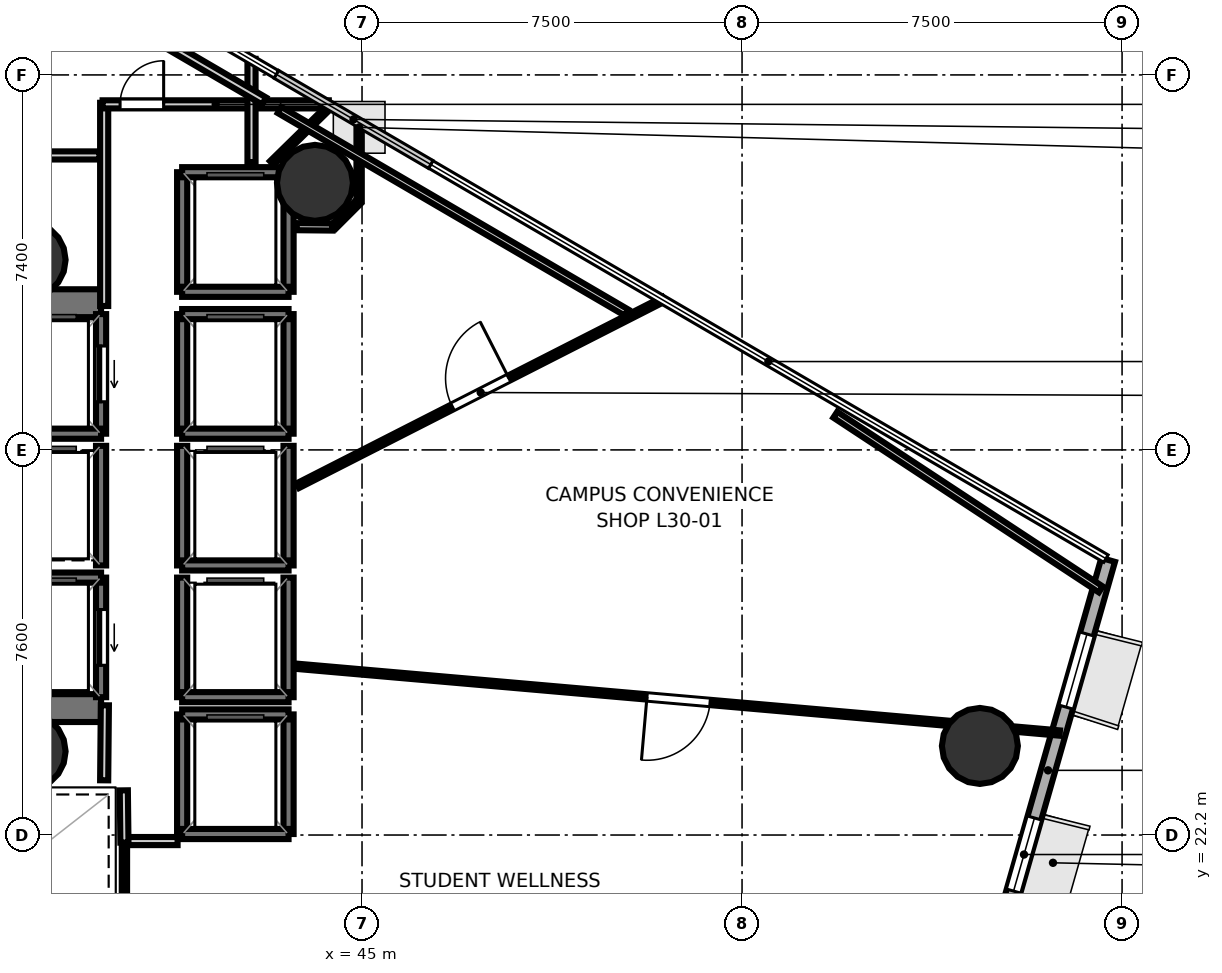
"""IFC4 building model, lengths in metres.
Left out: names, types, materials, properties, quantities, classifications, styles, units other than length and angle.
Written with IfcOpenShell. Run it as: python <this file> out.ifc"""

import sys

from ifc_helpers import new_model, si_unit, direction, frame, frame_2d, origin, origin_2d, place, context, subcontext, project, spatial, rectangle, hollow_circle, extrude, element, fill, save


model = new_model("IFC4")
c1 = context("Model", 3, precision=1e-05, world=origin(), true_north=direction((0.0, 1.0)))
c2 = subcontext(c1, "Body", "Model", "MODEL_VIEW")
j1 = project(units=[si_unit("LENGTHUNIT", "METRE"), si_unit("PLANEANGLEUNIT", "RADIAN")], contexts=[c1])
p1 = place(None, origin())
s1 = spatial("IfcSite", under=j1, at=p1, CompositionType="ELEMENT")
p2 = place(p1, origin())
s2 = spatial("IfcBuilding", under=s1, at=p2, CompositionType="ELEMENT")
p3 = place(p2, frame((0.0, 0.0, 120.0)))
s3 = spatial("IfcBuildingStorey", under=s2, at=p3, CompositionType="ELEMENT", Elevation=120.0)
p4 = place(p3, frame((29.23, 32.695, 0.0), z_axis=(0.0, 0.0, 1.0), x_axis=(1.0, 0.0, 0.0)))
e1 = element("IfcWall", 1, at=p4, inside=s3, PredefinedType="SHEAR", context=c2, shape_type="SweptSolid", body=[
    extrude(rectangle(XDim=10.62, YDim=0.55, at=frame_2d((5.31, 0.0))), origin(), (0.0, 0.0, 1.0), 3.52),
])
p5 = place(p4, frame((0.995, 0.0, 0.0)))
e2 = element("IfcOpeningElement", 2, at=p5, cuts=e1, PredefinedType="OPENING", context=c2, shape_type="SweptSolid", body=[
    extrude(rectangle(XDim=1.25, YDim=2.15, at=frame_2d((0.625, 1.075))), frame((0.0, 0.285, 0.0), z_axis=(0.0, -1.0, 0.0), x_axis=(1.0, 0.0, 0.0)), (0.0, 0.0, 1.0), 0.57),
])
p6 = place(p3, frame((29.23, 24.705, 0.0), z_axis=(0.0, 0.0, 1.0), x_axis=(1.0, 0.0, 0.0)))
e3 = element("IfcWall", 3, at=p6, inside=s3, PredefinedType="SHEAR", context=c2, shape_type="SweptSolid", body=[
    extrude(rectangle(XDim=10.62, YDim=0.55, at=frame_2d((5.31, 0.0))), origin(), (0.0, 0.0, 1.0), 3.52),
])
p7 = place(p6, frame((0.795, 0.0, 0.0)))
e4 = element("IfcOpeningElement", 4, at=p7, cuts=e3, PredefinedType="OPENING", context=c2, shape_type="SweptSolid", body=[
    extrude(rectangle(XDim=1.25, YDim=2.15, at=frame_2d((0.625, 1.075))), frame((0.0, 0.285, 0.0), z_axis=(0.0, -1.0, 0.0), x_axis=(1.0, 0.0, 0.0)), (0.0, 0.0, 1.0), 0.57),
])
for number, where, z_axis, x_axis in (
    (5, (38.4, 33.55, 0.0), (0.0, 0.0, 1.0), (1.0, 0.0, 0.0)),
    (6, (38.4, 23.85, 0.0), (0.0, 0.0, 1.0), (1.0, 0.0, 0.0)),
    (7, (57.194, 23.958, 0.0), (0.0, 0.0, 1.0), (1.0, 0.0, 0.0)),
    (8, (44.071, 35.07, 0.0), (0.0, 0.0, 1.0), (1.0, 0.0, 0.0)),
):
    element("IfcColumn", number, at=place(p3, frame(where, z_axis=z_axis, x_axis=x_axis)), inside=s3, PredefinedType="COLUMN", context=c2, shape_type="SweptSolid", body=[
        extrude(hollow_circle(Radius=0.75, WallThickness=0.036, at=origin_2d()), origin(), (0.0, 0.0, 1.0), 3.7),
    ])
p8 = place(p3, frame((57.353, 19.323, 0.0), z_axis=(0.0, 0.0, 1.0), x_axis=(0.274694997196, 0.961531413171, 0.0)))
e9 = element("IfcWall", 9, at=p8, inside=s3, PredefinedType="SOLIDWALL", context=c2, shape_type="SweptSolid", body=[
    extrude(rectangle(XDim=8.638, YDim=0.28, at=frame_2d((4.319, 0.0))), origin(), (0.0, 0.0, 1.0), 3.52),
])
p9 = place(p8, frame((1.841, 0.0, 0.85)))
e10 = element("IfcOpeningElement", 10, at=p9, cuts=e9, PredefinedType="OPENING", context=c2, shape_type="SweptSolid", body=[
    extrude(rectangle(XDim=1.5, YDim=2.1, at=frame_2d((0.75, 1.05))), frame((0.0, 0.15, 0.0), z_axis=(0.0, -1.0, 0.0), x_axis=(1.0, 0.0, 0.0)), (0.0, 0.0, 1.0), 0.3),
])
p10 = place(p8, frame((5.616, 0.0, 0.85)))
e11 = element("IfcOpeningElement", 11, at=p10, cuts=e9, PredefinedType="OPENING", context=c2, shape_type="SweptSolid", body=[
    extrude(rectangle(XDim=1.5, YDim=2.1, at=frame_2d((0.75, 1.05))), frame((0.0, 0.15, 0.0), z_axis=(0.0, -1.0, 0.0), x_axis=(1.0, 0.0, 0.0)), (0.0, 0.0, 1.0), 0.3),
])
p11 = place(p3, frame((39.85, 30.12, 0.0), z_axis=(0.0, 0.0, 1.0), x_axis=(0.0, 1.0, 0.0)))
e12 = element("IfcWall", 12, at=p11, inside=s3, PredefinedType="SOLIDWALL", context=c2, shape_type="SweptSolid", body=[
    extrude(rectangle(XDim=2.36, YDim=0.2, at=frame_2d((1.18, 0.0))), origin(), (0.0, 0.0, 1.0), 3.52),
])
p12 = place(p11, frame((0.63, 0.0, 0.0)))
e13 = element("IfcOpeningElement", 13, at=p12, cuts=e12, PredefinedType="OPENING", context=c2, shape_type="SweptSolid", body=[
    extrude(rectangle(XDim=1.1, YDim=2.15, at=frame_2d((0.55, 1.075))), frame((0.0, 0.11, 0.0), z_axis=(0.0, -1.0, 0.0), x_axis=(1.0, 0.0, 0.0)), (0.0, 0.0, 1.0), 0.22),
])
p13 = place(p3, frame((37.75, 30.12, 0.0), z_axis=(0.0, 0.0, 1.0), x_axis=(1.0, 0.0, 0.0)))
e14 = element("IfcWall", 14, at=p13, inside=s3, PredefinedType="SOLIDWALL", context=c2, shape_type="SweptSolid", body=[
    extrude(rectangle(XDim=2.1, YDim=0.2, at=frame_2d((1.05, 0.0))), origin(), (0.0, 0.0, 1.0), 3.52),
])
p14 = place(p3, frame((39.85, 24.92, 0.0), z_axis=(0.0, 0.0, 1.0), x_axis=(0.0, 1.0, 0.0)))
e15 = element("IfcWall", 15, at=p14, inside=s3, PredefinedType="SOLIDWALL", context=c2, shape_type="SweptSolid", body=[
    extrude(rectangle(XDim=2.36, YDim=0.2, at=frame_2d((1.18, 0.0))), origin(), (0.0, 0.0, 1.0), 3.52),
])
p15 = place(p14, frame((0.63, 0.0, 0.0)))
e16 = element("IfcOpeningElement", 16, at=p15, cuts=e15, PredefinedType="OPENING", context=c2, shape_type="SweptSolid", body=[
    extrude(rectangle(XDim=1.1, YDim=2.15, at=frame_2d((0.55, 1.075))), frame((0.0, 0.11, 0.0), z_axis=(0.0, -1.0, 0.0), x_axis=(1.0, 0.0, 0.0)), (0.0, 0.0, 1.0), 0.22),
])
p16 = place(p3, frame((37.75, 27.28, 0.0), z_axis=(0.0, 0.0, 1.0), x_axis=(1.0, 0.0, 0.0)))
e17 = element("IfcWall", 17, at=p16, inside=s3, PredefinedType="SOLIDWALL", context=c2, shape_type="SweptSolid", body=[
    extrude(rectangle(XDim=2.1, YDim=0.2, at=frame_2d((1.05, 0.0))), origin(), (0.0, 0.0, 1.0), 3.52),
])
for number, where, z_axis, x_axis in (
    (18, (43.55, 30.12, 0.0), (0.0, 0.0, 1.0), (0.0, 1.0, 0.0)),
    (19, (41.45, 30.12, 0.0), (0.0, 0.0, 1.0), (0.0, 1.0, 0.0)),
):
    element("IfcWall", number, at=place(p3, frame(where, z_axis=z_axis, x_axis=x_axis)), inside=s3, PredefinedType="SOLIDWALL", context=c2, shape_type="SweptSolid", body=[
        extrude(rectangle(XDim=2.36, YDim=0.2, at=frame_2d((1.18, 0.0))), origin(), (0.0, 0.0, 1.0), 3.52),
    ])
for number, where, z_axis, x_axis in (
    (20, (41.45, 32.48, 0.0), (0.0, 0.0, 1.0), (1.0, 0.0, 0.0)),
    (21, (41.45, 30.12, 0.0), (0.0, 0.0, 1.0), (1.0, 0.0, 0.0)),
):
    element("IfcWall", number, at=place(p3, frame(where, z_axis=z_axis, x_axis=x_axis)), inside=s3, PredefinedType="SOLIDWALL", context=c2, shape_type="SweptSolid", body=[
        extrude(rectangle(XDim=2.1, YDim=0.2, at=frame_2d((1.05, 0.0))), origin(), (0.0, 0.0, 1.0), 3.52),
    ])
for number, where, z_axis, x_axis in (
    (22, (43.55, 27.52, 0.0), (0.0, 0.0, 1.0), (0.0, 1.0, 0.0)),
    (23, (41.45, 27.52, 0.0), (0.0, 0.0, 1.0), (0.0, 1.0, 0.0)),
):
    element("IfcWall", number, at=place(p3, frame(where, z_axis=z_axis, x_axis=x_axis)), inside=s3, PredefinedType="SOLIDWALL", context=c2, shape_type="SweptSolid", body=[
        extrude(rectangle(XDim=2.36, YDim=0.2, at=frame_2d((1.18, 0.0))), origin(), (0.0, 0.0, 1.0), 3.52),
    ])
p17 = place(p3, frame((41.45, 27.52, 0.0), z_axis=(0.0, 0.0, 1.0), x_axis=(1.0, 0.0, 0.0)))
e24 = element("IfcWall", 24, at=p17, inside=s3, PredefinedType="SOLIDWALL", context=c2, shape_type="SweptSolid", body=[
    extrude(rectangle(XDim=2.1, YDim=0.2, at=frame_2d((1.05, 0.0))), origin(), (0.0, 0.0, 1.0), 3.52),
])
for number, where, z_axis, x_axis in (
    (25, (43.55, 24.92, 0.0), (0.0, 0.0, 1.0), (0.0, 1.0, 0.0)),
    (26, (41.45, 24.92, 0.0), (0.0, 0.0, 1.0), (0.0, 1.0, 0.0)),
):
    element("IfcWall", number, at=place(p3, frame(where, z_axis=z_axis, x_axis=x_axis)), inside=s3, PredefinedType="SOLIDWALL", context=c2, shape_type="SweptSolid", body=[
        extrude(rectangle(XDim=2.36, YDim=0.2, at=frame_2d((1.18, 0.0))), origin(), (0.0, 0.0, 1.0), 3.52),
    ])
p18 = place(p3, frame((41.45, 24.92, 0.0), z_axis=(0.0, 0.0, 1.0), x_axis=(1.0, 0.0, 0.0)))
e27 = element("IfcWall", 27, at=p18, inside=s3, PredefinedType="SOLIDWALL", context=c2, shape_type="SweptSolid", body=[
    extrude(rectangle(XDim=2.1, YDim=0.2, at=frame_2d((1.05, 0.0))), origin(), (0.0, 0.0, 1.0), 3.52),
])
p19 = place(p3, frame((39.85, 27.52, 0.0), z_axis=(0.0, 0.0, 1.0), x_axis=(0.0, 1.0, 0.0)))
e28 = element("IfcWall", 28, at=p19, inside=s3, PredefinedType="SOLIDWALL", context=c2, shape_type="SweptSolid", body=[
    extrude(rectangle(XDim=2.36, YDim=0.2, at=frame_2d((1.18, 0.0))), origin(), (0.0, 0.0, 1.0), 3.52),
])
for number, where, z_axis, x_axis in (
    (29, (43.55, 22.22, 0.0), (0.0, 0.0, 1.0), (0.0, 1.0, 0.0)),
    (30, (41.45, 22.22, 0.0), (0.0, 0.0, 1.0), (0.0, 1.0, 0.0)),
):
    element("IfcWall", number, at=place(p3, frame(where, z_axis=z_axis, x_axis=x_axis)), inside=s3, PredefinedType="SOLIDWALL", context=c2, shape_type="SweptSolid", body=[
        extrude(rectangle(XDim=2.36, YDim=0.2, at=frame_2d((1.18, 0.0))), origin(), (0.0, 0.0, 1.0), 3.52),
    ])
for number, where, z_axis, x_axis in (
    (31, (41.45, 24.58, 0.0), (0.0, 0.0, 1.0), (1.0, 0.0, 0.0)),
    (32, (41.45, 22.22, 0.0), (0.0, 0.0, 1.0), (1.0, 0.0, 0.0)),
):
    element("IfcWall", number, at=place(p3, frame(where, z_axis=z_axis, x_axis=x_axis)), inside=s3, PredefinedType="SOLIDWALL", context=c2, shape_type="SweptSolid", body=[
        extrude(rectangle(XDim=2.1, YDim=0.2, at=frame_2d((1.05, 0.0))), origin(), (0.0, 0.0, 1.0), 3.52),
    ])
for number, where, z_axis, x_axis in (
    (33, (43.55, 32.92, 0.0), (0.0, 0.0, 1.0), (0.0, 1.0, 0.0)),
    (34, (41.45, 32.92, 0.0), (0.0, 0.0, 1.0), (0.0, 1.0, 0.0)),
):
    element("IfcWall", number, at=place(p3, frame(where, z_axis=z_axis, x_axis=x_axis)), inside=s3, PredefinedType="SOLIDWALL", context=c2, shape_type="SweptSolid", body=[
        extrude(rectangle(XDim=2.36, YDim=0.2, at=frame_2d((1.18, 0.0))), origin(), (0.0, 0.0, 1.0), 3.52),
    ])
for number, where, z_axis, x_axis in (
    (35, (41.45, 35.28, 0.0), (0.0, 0.0, 1.0), (1.0, 0.0, 0.0)),
    (36, (41.45, 32.92, 0.0), (0.0, 0.0, 1.0), (1.0, 0.0, 0.0)),
):
    element("IfcWall", number, at=place(p3, frame(where, z_axis=z_axis, x_axis=x_axis)), inside=s3, PredefinedType="SOLIDWALL", context=c2, shape_type="SweptSolid", body=[
        extrude(rectangle(XDim=2.1, YDim=0.2, at=frame_2d((1.05, 0.0))), origin(), (0.0, 0.0, 1.0), 3.52),
    ])
p20 = place(p3, frame((39.911, 32.64, 0.0), z_axis=(0.0, 0.0, 1.0), x_axis=(0.0, 1.0, 0.0)))
e37 = element("IfcWall", 37, at=p20, inside=s3, PredefinedType="PARTITIONING", context=c2, shape_type="SweptSolid", body=[
    extrude(rectangle(XDim=4.01, YDim=0.16, at=frame_2d((2.005, 0.0))), origin(), (0.0, 0.0, 1.0), 2.84),
])
p21 = place(p3, frame((39.88, 36.619, 0.0), z_axis=(0.0, 0.0, 1.0), x_axis=(1.0, 0.0, 0.0)))
e38 = element("IfcWall", 38, at=p21, inside=s3, PredefinedType="PARTITIONING", context=c2, shape_type="SweptSolid", body=[
    extrude(rectangle(XDim=4.465, YDim=0.16, at=frame_2d((2.232, 0.0))), origin(), (0.0, 0.0, 1.0), 2.84),
])
p22 = place(p21, frame((0.345, 0.0, 0.0)))
e39 = element("IfcOpeningElement", 39, at=p22, cuts=e38, PredefinedType="OPENING", context=c2, shape_type="SweptSolid", body=[
    extrude(rectangle(XDim=0.86, YDim=2.05, at=frame_2d((0.43, 1.025))), frame((0.0, 0.09, 0.0), z_axis=(0.0, -1.0, 0.0), x_axis=(1.0, 0.0, 0.0)), (0.0, 0.0, 1.0), 0.18),
])
p23 = place(p3, frame((42.819, 37.518, 0.0), z_axis=(0.0, 0.0, 1.0), x_axis=(0.0, -1.0, 0.0)))
e40 = element("IfcWall", 40, at=p23, inside=s3, PredefinedType="PARTITIONING", context=c2, shape_type="SweptSolid", body=[
    extrude(rectangle(XDim=2.038, YDim=0.16, at=frame_2d((1.019, 0.0))), origin(), (0.0, 0.0, 1.0), 2.84),
])
p24 = place(p3, frame((41.36, 22.081, 0.0), z_axis=(0.0, 0.0, 1.0), x_axis=(-1.0, 0.0, 0.0)))
e41 = element("IfcWall", 41, at=p24, inside=s3, PredefinedType="PARTITIONING", context=c2, shape_type="SweptSolid", body=[
    extrude(rectangle(XDim=1.08, YDim=0.16, at=frame_2d((0.54, 0.0))), origin(), (0.0, 0.0, 1.0), 2.84),
])
p25 = place(p3, frame((40.311, 22.05, 0.0), z_axis=(0.0, 0.0, 1.0), x_axis=(-0.011836292006, 0.999929948642, 0.0)))
e42 = element("IfcWall", 42, at=p25, inside=s3, PredefinedType="PARTITIONING", context=c2, shape_type="SweptSolid", body=[
    extrude(rectangle(XDim=1.031, YDim=0.16, at=frame_2d((0.516, 0.0))), origin(), (0.0, 0.0, 1.0), 2.84),
])
p26 = place(p3, frame((39.911, 23.28, 0.0), z_axis=(0.0, 0.0, 1.0), x_axis=(0.009397771291, 0.999955839972, 0.0)))
e43 = element("IfcWall", 43, at=p26, inside=s3, PredefinedType="PARTITIONING", context=c2, shape_type="SweptSolid", body=[
    extrude(rectangle(XDim=1.481, YDim=0.16, at=frame_2d((0.74, 0.0))), origin(), (0.0, 0.0, 1.0), 2.84),
])
p27 = place(p3, frame((40.091, 38.423, 0.0), z_axis=(0.0, 0.0, 1.0), x_axis=(0.863647873361, -0.504095577088, 0.0)))
e44 = element("IfcWall", 44, at=p27, inside=s3, PredefinedType="PARTITIONING", context=c2, shape_type="SweptSolid", body=[
    extrude(rectangle(XDim=3.447, YDim=0.16, at=frame_2d((1.724, 0.0))), origin(), (0.0, 0.0, 1.0), 2.84),
])
p28 = place(p3, frame((39.818, 35.611, 0.0), z_axis=(0.0, 0.0, 1.0), x_axis=(-1.0, 0.0, 0.0)))
e45 = element("IfcWall", 45, at=p28, inside=s3, PredefinedType="PARTITIONING", context=c2, shape_type="SweptSolid", body=[
    extrude(rectangle(XDim=2.968, YDim=0.16, at=frame_2d((1.484, 0.0))), origin(), (0.0, 0.0, 1.0), 2.84),
])
p29 = place(p3, frame((43.734, 29.094, 0.0), z_axis=(0.0, 0.0, 1.0), x_axis=(0.891006824912, 0.453989909536, 0.0)))
e46 = element("IfcWall", 46, at=p29, inside=s3, PredefinedType="PARTITIONING", context=c2, shape_type="SweptSolid", body=[
    extrude(rectangle(XDim=8.098, YDim=0.105, at=frame_2d((4.049, 0.0))), origin(), (0.0, 0.0, 1.0), 2.84),
])
p30 = place(p29, frame((3.424, 0.0, 0.0)))
e47 = element("IfcOpeningElement", 47, at=p30, cuts=e46, PredefinedType="OPENING", context=c2, shape_type="SweptSolid", body=[
    extrude(rectangle(XDim=1.25, YDim=2.2, at=frame_2d((0.625, 1.1))), frame((0.0, 0.062, 0.0), z_axis=(0.0, -1.0, 0.0), x_axis=(1.0, 0.0, 0.0)), (0.0, 0.0, 1.0), 0.125),
])
p31 = place(p3, frame((54.34, 30.495, 0.0), z_axis=(0.0, 0.0, 1.0), x_axis=(0.835388859016, -0.549659398384, 0.0)))
e48 = element("IfcWall", 48, at=p31, inside=s3, PredefinedType="PARTITIONING", context=c2, shape_type="SweptSolid", body=[
    extrude(rectangle(XDim=6.272, YDim=0.14, at=frame_2d((3.136, 0.0))), origin(), (0.0, 0.0, 1.0), 2.84),
])
p32 = place(p3, frame((58.77, 24.212, 0.0), z_axis=(0.0, 0.0, 1.0), x_axis=(-0.996194963042, 0.087152714304, 0.0)))
e49 = element("IfcWall", 49, at=p32, inside=s3, PredefinedType="PARTITIONING", context=c2, shape_type="SweptSolid", body=[
    extrude(rectangle(XDim=15.104, YDim=0.105, at=frame_2d((7.552, 0.0))), origin(), (0.0, 0.0, 1.0), 2.84),
])
p33 = place(p32, frame((6.927, 0.0, 0.0)))
e50 = element("IfcOpeningElement", 50, at=p33, cuts=e49, PredefinedType="OPENING", context=c2, shape_type="SweptSolid", body=[
    extrude(rectangle(XDim=1.25, YDim=2.2, at=frame_2d((0.625, 1.1))), frame((0.0, 0.062, 0.0), z_axis=(0.0, -1.0, 0.0), x_axis=(1.0, 0.0, 0.0)), (0.0, 0.0, 1.0), 0.125),
])
p34 = place(p3, frame((43.709, 34.205, 0.0), z_axis=(0.0, 0.0, 1.0), x_axis=(0.999950278433, -0.009971993836, 0.0)))
e51 = element("IfcWall", 51, at=p34, inside=s3, PredefinedType="PARTITIONING", context=c2, shape_type="SweptSolid", body=[
    extrude(rectangle(XDim=0.71, YDim=0.14, at=frame_2d((0.355, 0.0))), origin(), (0.0, 0.0, 1.0), 2.84),
])
p35 = place(p3, frame((44.441, 34.207, 0.0), z_axis=(0.0, 0.0, 1.0), x_axis=(0.707106781187, 0.707106781187, 0.0)))
e52 = element("IfcWall", 52, at=p35, inside=s3, PredefinedType="PARTITIONING", context=c2, shape_type="SweptSolid", body=[
    extrude(rectangle(XDim=0.696, YDim=0.12, at=frame_2d((0.348, 0.0))), origin(), (0.0, 0.0, 1.0), 2.84),
])
p36 = place(p3, frame((44.943, 34.722, 0.0), z_axis=(0.0, 0.0, 1.0), x_axis=(0.0, 1.0, 0.0)))
e53 = element("IfcWall", 53, at=p36, inside=s3, PredefinedType="PARTITIONING", context=c2, shape_type="SweptSolid", body=[
    extrude(rectangle(XDim=1.556, YDim=0.105, at=frame_2d((0.778, 0.0))), origin(), (0.0, 0.0, 1.0), 2.84),
])
p37 = place(p3, frame((44.387, 36.605, 0.0), z_axis=(0.0, 0.0, 1.0), x_axis=(-0.714539998756, -0.699594589872, 0.0)))
e54 = element("IfcWall", 54, at=p37, inside=s3, PredefinedType="PARTITIONING", context=c2, shape_type="SweptSolid", body=[
    extrude(rectangle(XDim=1.634, YDim=0.105, at=frame_2d((0.817, 0.0))), origin(), (0.0, 0.0, 1.0), 2.84),
])
p38 = place(p3, frame((43.372, 36.508, 0.0), z_axis=(0.0, 0.0, 1.0), x_axis=(0.863637070214, -0.504114085255, 0.0)))
e55 = element("IfcWall", 55, at=p38, inside=s3, PredefinedType="PARTITIONING", context=c2, shape_type="SweptSolid", body=[
    extrude(rectangle(XDim=7.931, YDim=0.14, at=frame_2d((3.965, 0.0))), origin(), (0.0, 0.0, 1.0), 2.84),
])
p39 = place(p3, frame((40.31, 17.972, 0.0), z_axis=(0.0, 0.0, 1.0), x_axis=(0.000305362145, 0.999999953377, 0.0)))
e56 = element("IfcWall", 56, at=p39, inside=s3, PredefinedType="PARTITIONING", context=c2, shape_type="SweptSolid", body=[
    extrude(rectangle(XDim=3.998, YDim=0.105, at=frame_2d((1.999, 0.0))), origin(), (0.0, 0.0, 1.0), 2.84),
])
p40 = place(p12, origin())
e57 = element("IfcDoor", 57, at=p40, inside=s3, OperationType="SLIDING_TO_LEFT", PredefinedType="DOOR", context=c2, shape_type="SweptSolid", body=[
    extrude(rectangle(XDim=1.1, YDim=2.15, at=frame_2d((0.55, 1.075))), frame((0.0, 0.025, 0.0), z_axis=(0.0, -1.0, 0.0), x_axis=(1.0, 0.0, 0.0)), (0.0, 0.0, 1.0), 0.05),
])
fill(e13, e57)
p41 = place(p15, origin())
e58 = element("IfcDoor", 58, at=p41, inside=s3, OperationType="SLIDING_TO_LEFT", PredefinedType="DOOR", context=c2, shape_type="SweptSolid", body=[
    extrude(rectangle(XDim=1.1, YDim=2.15, at=frame_2d((0.55, 1.075))), frame((0.0, 0.025, 0.0), z_axis=(0.0, -1.0, 0.0), x_axis=(1.0, 0.0, 0.0)), (0.0, 0.0, 1.0), 0.05),
])
fill(e16, e58)
p42 = place(p22, origin())
e59 = element("IfcDoor", 59, at=p42, inside=s3, OperationType="SINGLE_SWING_RIGHT", PredefinedType="DOOR", context=c2, shape_type="SweptSolid", body=[
    extrude(rectangle(XDim=0.86, YDim=2.05, at=frame_2d((0.43, 1.025))), frame((0.0, 0.025, 0.0), z_axis=(0.0, -1.0, 0.0), x_axis=(1.0, 0.0, 0.0)), (0.0, 0.0, 1.0), 0.05),
])
fill(e39, e59)
p43 = place(p33, origin())
e60 = element("IfcDoor", 60, at=p43, inside=s3, OperationType="SINGLE_SWING_RIGHT", PredefinedType="DOOR", context=c2, shape_type="SweptSolid", body=[
    extrude(rectangle(XDim=1.25, YDim=2.2, at=frame_2d((0.625, 1.1))), frame((0.0, 0.025, 0.0), z_axis=(0.0, -1.0, 0.0), x_axis=(1.0, 0.0, 0.0)), (0.0, 0.0, 1.0), 0.05),
])
fill(e50, e60)
p44 = place(p30, origin())
e61 = element("IfcDoor", 61, at=p44, inside=s3, OperationType="SINGLE_SWING_RIGHT", PredefinedType="DOOR", context=c2, shape_type="SweptSolid", body=[
    extrude(rectangle(XDim=1.25, YDim=2.2, at=frame_2d((0.625, 1.1))), frame((0.0, 0.025, 0.0), z_axis=(0.0, -1.0, 0.0), x_axis=(1.0, 0.0, 0.0)), (0.0, 0.0, 1.0), 0.05),
])
fill(e47, e61)
p45 = place(p9, origin())
e62 = element("IfcWindow", 62, at=p45, inside=s3, PartitioningType="SINGLE_PANEL", PredefinedType="WINDOW", context=c2, shape_type="SweptSolid", body=[
    extrude(rectangle(XDim=1.5, YDim=2.1, at=frame_2d((0.75, 1.05))), frame((0.0, 0.03, 0.0), z_axis=(0.0, -1.0, 0.0), x_axis=(1.0, 0.0, 0.0)), (0.0, 0.0, 1.0), 0.06),
])
fill(e10, e62)
p46 = place(p10, origin())
e63 = element("IfcWindow", 63, at=p46, inside=s3, PartitioningType="SINGLE_PANEL", PredefinedType="WINDOW", context=c2, shape_type="SweptSolid", body=[
    extrude(rectangle(XDim=1.5, YDim=2.1, at=frame_2d((0.75, 1.05))), frame((0.0, 0.03, 0.0), z_axis=(0.0, -1.0, 0.0), x_axis=(1.0, 0.0, 0.0)), (0.0, 0.0, 1.0), 0.06),
])
fill(e11, e63)
save(model, sys.argv[1])
